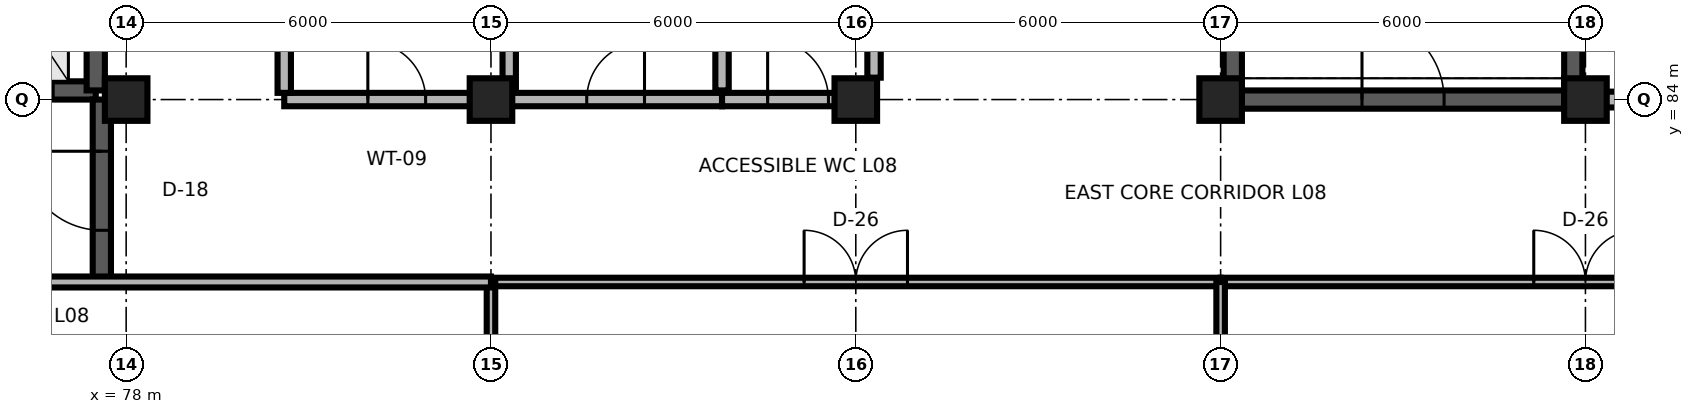
"""IFC4 building model, lengths in metres.
Left out: names, types, materials, properties, quantities, classifications, styles, units other than length and angle.
Written with IfcOpenShell. Run it as: python <this file> out.ifc"""

import sys

from ifc_helpers import new_model, si_unit, direction, frame, frame_2d, origin, origin_2d, place, context, subcontext, project, spatial, rectangle, extrude, element, fill, save


model = new_model("IFC4")
c1 = context("Model", 3, precision=1e-05, world=origin(), true_north=direction((0.0, 1.0)))
c2 = subcontext(c1, "Body", "Model", "MODEL_VIEW")
j1 = project(units=[si_unit("LENGTHUNIT", "METRE"), si_unit("PLANEANGLEUNIT", "RADIAN")], contexts=[c1])
p1 = place(None, origin())
s1 = spatial("IfcSite", under=j1, at=p1, CompositionType="ELEMENT")
p2 = place(p1, origin())
s2 = spatial("IfcBuilding", under=s1, at=p2, CompositionType="ELEMENT")
p3 = place(p2, frame((0.0, 0.0, 32.7)))
s3 = spatial("IfcBuildingStorey", under=s2, at=p3, CompositionType="ELEMENT", Elevation=32.7)
for number, where, z_axis, x_axis in (
    (1, (78.0, 84.0, 0.0), (0.0, 0.0, 1.0), (1.0, 0.0, 0.0)),
    (2, (84.0, 84.0, 0.0), (0.0, 0.0, 1.0), (1.0, 0.0, 0.0)),
    (3, (90.0, 84.0, 0.0), (0.0, 0.0, 1.0), (1.0, 0.0, 0.0)),
    (4, (96.0, 84.0, 0.0), (0.0, 0.0, 1.0), (1.0, 0.0, 0.0)),
    (5, (102.0, 84.0, 0.0), (0.0, 0.0, 1.0), (1.0, 0.0, 0.0)),
):
    element("IfcColumn", number, at=place(p3, frame(where, z_axis=z_axis, x_axis=x_axis)), inside=s3, PredefinedType="COLUMN", context=c2, shape_type="SweptSolid", body=[
        extrude(rectangle(XDim=0.7, YDim=0.7, at=origin_2d()), origin(), (0.0, 0.0, 1.0), 3.9),
    ])
p4 = place(p3, frame((96.35, 84.0, 0.0), z_axis=(0.0, 0.0, 1.0), x_axis=(1.0, 0.0, 0.0)))
e6 = element("IfcWall", 6, at=p4, inside=s3, PredefinedType="SHEAR", context=c2, shape_type="SweptSolid", body=[
    extrude(rectangle(XDim=5.3, YDim=0.3, at=frame_2d((2.65, 0.0))), origin(), (0.0, 0.0, 1.0), 3.66),
])
p5 = place(p4, frame((1.975, 0.0, 0.0)))
e7 = element("IfcOpeningElement", 7, at=p5, cuts=e6, PredefinedType="OPENING", context=c2, shape_type="SweptSolid", body=[
    extrude(rectangle(XDim=1.35, YDim=2.2, at=frame_2d((0.675, 1.1))), frame((0.0, 0.165, 0.0), z_axis=(0.0, -1.0, 0.0), x_axis=(1.0, 0.0, 0.0)), (0.0, 0.0, 1.0), 0.33),
])
for number, where, z_axis, x_axis in (
    (8, (96.2, 84.0, 0.0), (0.0, 0.0, 1.0), (0.0, 1.0, 0.0)),
    (9, (101.8, 84.0, 0.0), (0.0, 0.0, 1.0), (0.0, 1.0, 0.0)),
):
    element("IfcWall", number, at=place(p3, frame(where, z_axis=z_axis, x_axis=x_axis)), inside=s3, PredefinedType="SHEAR", context=c2, shape_type="SweptSolid", body=[
        extrude(rectangle(XDim=11.8, YDim=0.3, at=frame_2d((5.9, 0.0))), origin(), (0.0, 0.0, 1.0), 3.74),
    ])
p6 = place(p3, frame((75.0, 84.15, 0.0), z_axis=(0.0, 0.0, 1.0), x_axis=(1.0, 0.0, 0.0)))
e10 = element("IfcWall", 10, at=p6, inside=s3, PredefinedType="SHEAR", context=c2, shape_type="SweptSolid", body=[
    extrude(rectangle(XDim=2.5, YDim=0.3, at=frame_2d((1.25, 0.0))), origin(), (0.0, 0.0, 1.0), 3.74),
])
p7 = place(p6, frame((0.7, 0.0, 0.0)))
e11 = element("IfcOpeningElement", 11, at=p7, cuts=e10, PredefinedType="OPENING", context=c2, shape_type="SweptSolid", body=[
    extrude(rectangle(XDim=1.1, YDim=2.1, at=frame_2d((0.55, 1.05))), frame((0.0, 0.165, 0.0), z_axis=(0.0, -1.0, 0.0), x_axis=(1.0, 0.0, 0.0)), (0.0, 0.0, 1.0), 0.33),
])
p8 = place(p3, frame((77.5, 84.15, 0.0), z_axis=(0.0, 0.0, 1.0), x_axis=(0.0, 1.0, 0.0)))
e12 = element("IfcWall", 12, at=p8, inside=s3, PredefinedType="SHEAR", context=c2, shape_type="SweptSolid", body=[
    extrude(rectangle(XDim=3.4, YDim=0.3, at=frame_2d((1.7, 0.0))), origin(), (0.0, 0.0, 1.0), 3.74),
])
p9 = place(p3, frame((77.6, 81.0, 0.0), z_axis=(0.0, 0.0, 1.0), x_axis=(0.0, 1.0, 0.0)))
e13 = element("IfcWall", 13, at=p9, inside=s3, PredefinedType="SHEAR", context=c2, shape_type="SweptSolid", body=[
    extrude(rectangle(XDim=3.0, YDim=0.3, at=frame_2d((1.5, 0.0))), origin(), (0.0, 0.0, 1.0), 3.4),
])
p10 = place(p9, frame((0.85, 0.0, 0.0)))
e14 = element("IfcOpeningElement", 14, at=p10, cuts=e13, PredefinedType="OPENING", context=c2, shape_type="SweptSolid", body=[
    extrude(rectangle(XDim=1.3, YDim=2.2, at=frame_2d((0.65, 1.1))), frame((0.0, 0.165, 0.0), z_axis=(0.0, -1.0, 0.0), x_axis=(1.0, 0.0, 0.0)), (0.0, 0.0, 1.0), 0.33),
])
p11 = place(p3, frame((80.6, 84.0, 0.0), z_axis=(0.0, 0.0, 1.0), x_axis=(1.0, 0.0, 0.0)))
e15 = element("IfcWall", 15, at=p11, inside=s3, PredefinedType="PARTITIONING", context=c2, shape_type="SweptSolid", body=[
    extrude(rectangle(XDim=3.7, YDim=0.22, at=frame_2d((1.85, 0.0))), origin(), (0.0, 0.0, 1.0), 3.012),
])
p12 = place(p11, frame((1.375, 0.0, 0.0)))
e16 = element("IfcOpeningElement", 16, at=p12, cuts=e15, PredefinedType="OPENING", context=c2, shape_type="SweptSolid", body=[
    extrude(rectangle(XDim=0.95, YDim=2.15, at=frame_2d((0.475, 1.075))), frame((0.0, 0.125, 0.0), z_axis=(0.0, -1.0, 0.0), x_axis=(1.0, 0.0, 0.0)), (0.0, 0.0, 1.0), 0.25),
])
p13 = place(p3, frame((84.3, 84.0, 0.0), z_axis=(0.0, 0.0, 1.0), x_axis=(1.0, 0.0, 0.0)))
e17 = element("IfcWall", 17, at=p13, inside=s3, PredefinedType="PARTITIONING", context=c2, shape_type="SweptSolid", body=[
    extrude(rectangle(XDim=3.5, YDim=0.22, at=frame_2d((1.75, 0.0))), origin(), (0.0, 0.0, 1.0), 3.012),
])
p14 = place(p13, frame((1.275, 0.0, 0.0)))
e18 = element("IfcOpeningElement", 18, at=p14, cuts=e17, PredefinedType="OPENING", context=c2, shape_type="SweptSolid", body=[
    extrude(rectangle(XDim=0.95, YDim=2.1, at=frame_2d((0.475, 1.05))), frame((0.0, 0.125, 0.0), z_axis=(0.0, -1.0, 0.0), x_axis=(1.0, 0.0, 0.0)), (0.0, 0.0, 1.0), 0.25),
])
p15 = place(p3, frame((87.8, 84.0, 0.0), z_axis=(0.0, 0.0, 1.0), x_axis=(1.0, 0.0, 0.0)))
e19 = element("IfcWall", 19, at=p15, inside=s3, PredefinedType="PARTITIONING", context=c2, shape_type="SweptSolid", body=[
    extrude(rectangle(XDim=2.5, YDim=0.22, at=frame_2d((1.25, 0.0))), origin(), (0.0, 0.0, 1.0), 3.012),
])
p16 = place(p15, frame((0.75, 0.0, 0.0)))
e20 = element("IfcOpeningElement", 20, at=p16, cuts=e19, PredefinedType="OPENING", context=c2, shape_type="SweptSolid", body=[
    extrude(rectangle(XDim=1.0, YDim=2.15, at=frame_2d((0.5, 1.075))), frame((0.0, 0.125, 0.0), z_axis=(0.0, -1.0, 0.0), x_axis=(1.0, 0.0, 0.0)), (0.0, 0.0, 1.0), 0.25),
])
for number, where, z_axis, x_axis in (
    (21, (84.3, 84.15, 0.0), (0.0, 0.0, 1.0), (0.0, 1.0, 0.0)),
    (22, (87.8, 84.15, 0.0), (0.0, 0.0, 1.0), (0.0, 1.0, 0.0)),
):
    element("IfcWall", number, at=place(p3, frame(where, z_axis=z_axis, x_axis=x_axis)), inside=s3, PredefinedType="PARTITIONING", context=c2, shape_type="SweptSolid", body=[
        extrude(rectangle(XDim=5.0, YDim=0.22, at=frame_2d((2.5, 0.0))), origin(), (0.0, 0.0, 1.0), 3.4),
    ])
p17 = place(p3, frame((84.0, 81.0, 0.0), z_axis=(0.0, 0.0, 1.0), x_axis=(1.0, 0.0, 0.0)))
e23 = element("IfcWall", 23, at=p17, inside=s3, PredefinedType="PARTITIONING", context=c2, shape_type="SweptSolid", body=[
    extrude(rectangle(XDim=12.0, YDim=0.14, at=frame_2d((6.0, 0.0))), origin(), (0.0, 0.0, 1.0), 3.4),
])
p18 = place(p17, frame((5.15, 0.0, 0.0)))
e24 = element("IfcOpeningElement", 24, at=p18, cuts=e23, PredefinedType="OPENING", context=c2, shape_type="SweptSolid", body=[
    extrude(rectangle(XDim=1.7, YDim=2.45, at=frame_2d((0.85, 1.225))), frame((0.0, 0.085, 0.0), z_axis=(0.0, -1.0, 0.0), x_axis=(1.0, 0.0, 0.0)), (0.0, 0.0, 1.0), 0.17),
])
p19 = place(p3, frame((96.0, 81.0, 0.0), z_axis=(0.0, 0.0, 1.0), x_axis=(1.0, 0.0, 0.0)))
e25 = element("IfcWall", 25, at=p19, inside=s3, PredefinedType="PARTITIONING", context=c2, shape_type="SweptSolid", body=[
    extrude(rectangle(XDim=12.0, YDim=0.14, at=frame_2d((6.0, 0.0))), origin(), (0.0, 0.0, 1.0), 3.4),
])
p20 = place(p19, frame((5.15, 0.0, 0.0)))
e26 = element("IfcOpeningElement", 26, at=p20, cuts=e25, PredefinedType="OPENING", context=c2, shape_type="SweptSolid", body=[
    extrude(rectangle(XDim=1.7, YDim=2.45, at=frame_2d((0.85, 1.225))), frame((0.0, 0.085, 0.0), z_axis=(0.0, -1.0, 0.0), x_axis=(1.0, 0.0, 0.0)), (0.0, 0.0, 1.0), 0.17),
])
p21 = place(p3, frame((102.0, 84.0, 0.0), z_axis=(0.0, 0.0, 1.0), x_axis=(1.0, 0.0, 0.0)))
e27 = element("IfcWall", 27, at=p21, inside=s3, PredefinedType="PARTITIONING", context=c2, shape_type="SweptSolid", body=[
    extrude(rectangle(XDim=6.0, YDim=0.26, at=frame_2d((3.0, 0.0))), origin(), (0.0, 0.0, 1.0), 3.012),
])
p22 = place(p21, frame((2.225, 0.0, 0.0)))
e28 = element("IfcOpeningElement", 28, at=p22, cuts=e27, PredefinedType="OPENING", context=c2, shape_type="SweptSolid", body=[
    extrude(rectangle(XDim=1.55, YDim=2.3, at=frame_2d((0.775, 1.15))), frame((0.0, 0.145, 0.0), z_axis=(0.0, -1.0, 0.0), x_axis=(1.0, 0.0, 0.0)), (0.0, 0.0, 1.0), 0.29),
])
for number, where, z_axis, x_axis in (
    (29, (84.0, 72.65, 0.0), (0.0, 0.0, 1.0), (0.0, 1.0, 0.0)),
    (30, (96.0, 72.65, 0.0), (0.0, 0.0, 1.0), (0.0, 1.0, 0.0)),
):
    element("IfcWall", number, at=place(p3, frame(where, z_axis=z_axis, x_axis=x_axis)), inside=s3, PredefinedType="PARTITIONING", context=c2, shape_type="SweptSolid", body=[
        extrude(rectangle(XDim=8.35, YDim=0.14, at=frame_2d((4.175, 0.0))), origin(), (0.0, 0.0, 1.0), 3.012),
    ])
p23 = place(p3, frame((80.6, 84.11, 0.0), z_axis=(0.0, 0.0, 1.0), x_axis=(0.0, 1.0, 0.0)))
e31 = element("IfcWall", 31, at=p23, inside=s3, PredefinedType="PARTITIONING", context=c2, shape_type="SweptSolid", body=[
    extrude(rectangle(XDim=4.98, YDim=0.22, at=frame_2d((2.49, 0.0))), origin(), (0.0, 0.0, 1.0), 3.4),
])
p24 = place(p3, frame((90.3, 84.36, 0.0), z_axis=(0.0, 0.0, 1.0), x_axis=(0.0, 1.0, 0.0)))
e32 = element("IfcWall", 32, at=p24, inside=s3, PredefinedType="PARTITIONING", context=c2, shape_type="SweptSolid", body=[
    extrude(rectangle(XDim=4.73, YDim=0.22, at=frame_2d((2.365, 0.0))), origin(), (0.0, 0.0, 1.0), 3.4),
])
p25 = place(p3, frame((72.0, 81.0, 0.0), z_axis=(0.0, 0.0, 1.0), x_axis=(1.0, 0.0, 0.0)))
e33 = element("IfcWall", 33, at=p25, inside=s3, PredefinedType="PARTITIONING", context=c2, shape_type="SweptSolid", body=[
    extrude(rectangle(XDim=12.0, YDim=0.18, at=frame_2d((6.0, 0.0))), origin(), (0.0, 0.0, 1.0), 3.4),
])
p26 = place(p5, origin())
e34 = element("IfcDoor", 34, at=p26, inside=s3, OperationType="SINGLE_SWING_LEFT", PredefinedType="DOOR", context=c2, shape_type="SweptSolid", body=[
    extrude(rectangle(XDim=1.35, YDim=2.2, at=frame_2d((0.675, 1.1))), frame((0.0, 0.025, 0.0), z_axis=(0.0, -1.0, 0.0), x_axis=(1.0, 0.0, 0.0)), (0.0, 0.0, 1.0), 0.05),
])
fill(e7, e34)
p27 = place(p7, origin())
e35 = element("IfcDoor", 35, at=p27, inside=s3, OperationType="DOUBLE_DOOR_SLIDING", PredefinedType="DOOR", context=c2, shape_type="SweptSolid", body=[
    extrude(rectangle(XDim=1.1, YDim=2.1, at=frame_2d((0.55, 1.05))), frame((0.0, 0.025, 0.0), z_axis=(0.0, -1.0, 0.0), x_axis=(1.0, 0.0, 0.0)), (0.0, 0.0, 1.0), 0.05),
])
fill(e11, e35)
p28 = place(p10, origin())
e36 = element("IfcDoor", 36, at=p28, inside=s3, OperationType="SINGLE_SWING_RIGHT", PredefinedType="DOOR", context=c2, shape_type="SweptSolid", body=[
    extrude(rectangle(XDim=1.3, YDim=2.2, at=frame_2d((0.65, 1.1))), frame((0.0, 0.025, 0.0), z_axis=(0.0, -1.0, 0.0), x_axis=(1.0, 0.0, 0.0)), (0.0, 0.0, 1.0), 0.05),
])
fill(e14, e36)
p29 = place(p12, origin())
e37 = element("IfcDoor", 37, at=p29, inside=s3, OperationType="SINGLE_SWING_LEFT", PredefinedType="DOOR", context=c2, shape_type="SweptSolid", body=[
    extrude(rectangle(XDim=0.95, YDim=2.15, at=frame_2d((0.475, 1.075))), frame((0.0, 0.025, 0.0), z_axis=(0.0, -1.0, 0.0), x_axis=(1.0, 0.0, 0.0)), (0.0, 0.0, 1.0), 0.05),
])
fill(e16, e37)
p30 = place(p14, origin())
e38 = element("IfcDoor", 38, at=p30, inside=s3, OperationType="SINGLE_SWING_RIGHT", PredefinedType="DOOR", context=c2, shape_type="SweptSolid", body=[
    extrude(rectangle(XDim=0.95, YDim=2.1, at=frame_2d((0.475, 1.05))), frame((0.0, 0.025, 0.0), z_axis=(0.0, -1.0, 0.0), x_axis=(1.0, 0.0, 0.0)), (0.0, 0.0, 1.0), 0.05),
])
fill(e18, e38)
p31 = place(p16, origin())
e39 = element("IfcDoor", 39, at=p31, inside=s3, OperationType="SINGLE_SWING_LEFT", PredefinedType="DOOR", context=c2, shape_type="SweptSolid", body=[
    extrude(rectangle(XDim=1.0, YDim=2.15, at=frame_2d((0.5, 1.075))), frame((0.0, 0.025, 0.0), z_axis=(0.0, -1.0, 0.0), x_axis=(1.0, 0.0, 0.0)), (0.0, 0.0, 1.0), 0.05),
])
fill(e20, e39)
p32 = place(p18, origin())
e40 = element("IfcDoor", 40, at=p32, inside=s3, OperationType="DOUBLE_DOOR_SINGLE_SWING", PredefinedType="DOOR", context=c2, shape_type="SweptSolid", body=[
    extrude(rectangle(XDim=1.7, YDim=2.45, at=frame_2d((0.85, 1.225))), frame((0.0, 0.025, 0.0), z_axis=(0.0, -1.0, 0.0), x_axis=(1.0, 0.0, 0.0)), (0.0, 0.0, 1.0), 0.05),
])
fill(e24, e40)
p33 = place(p20, origin())
e41 = element("IfcDoor", 41, at=p33, inside=s3, OperationType="DOUBLE_DOOR_SINGLE_SWING", PredefinedType="DOOR", context=c2, shape_type="SweptSolid", body=[
    extrude(rectangle(XDim=1.7, YDim=2.45, at=frame_2d((0.85, 1.225))), frame((0.0, 0.025, 0.0), z_axis=(0.0, -1.0, 0.0), x_axis=(1.0, 0.0, 0.0)), (0.0, 0.0, 1.0), 0.05),
])
fill(e26, e41)
save(model, sys.argv[1])
